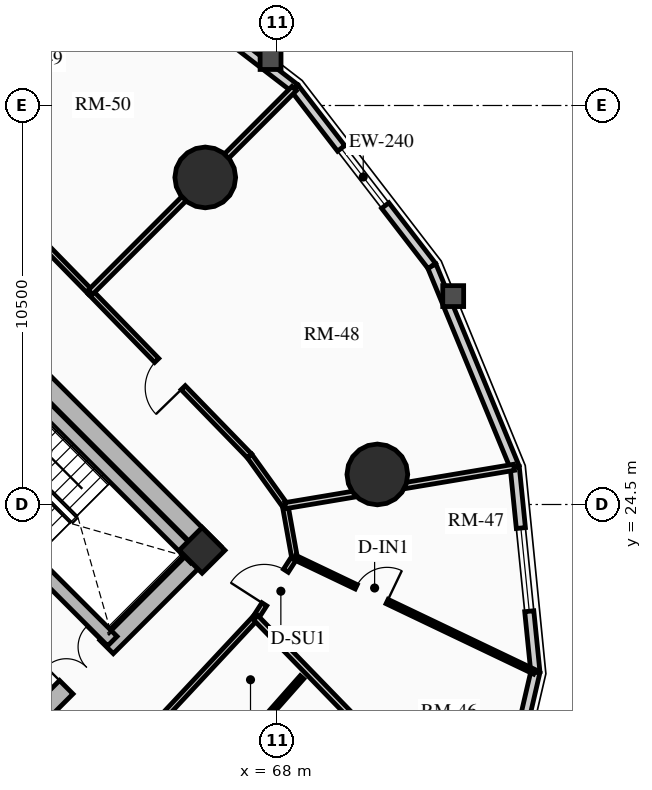
"""IFC4 building model, lengths in metres.
Left out: names, types, materials, properties, quantities, classifications, styles, units other than length and angle.
Written with IfcOpenShell. Run it as: python <this file> out.ifc"""

import sys

from ifc_helpers import new_model, si_unit, direction, frame, frame_2d, origin, origin_2d, place, context, subcontext, project, spatial, rectangle, circle, extrude, source, transform, mapped, element, fill, save


model = new_model("IFC4")
c1 = context("Model", 3, precision=1e-05, world=origin(), true_north=direction((0.0, 1.0)))
c2 = subcontext(c1, "Body", "Model", "MODEL_VIEW")
j1 = project(units=[si_unit("LENGTHUNIT", "METRE"), si_unit("PLANEANGLEUNIT", "RADIAN")], contexts=[c1])
p1 = place(None, origin())
s1 = spatial("IfcSite", under=j1, at=p1, CompositionType="ELEMENT")
p2 = place(p1, origin())
s2 = spatial("IfcBuilding", under=s1, at=p2, CompositionType="ELEMENT")
p3 = place(p2, frame((0.0, 0.0, 36.55)))
s3 = spatial("IfcBuildingStorey", under=s2, at=p3, CompositionType="ELEMENT", Elevation=36.55)
p4 = place(p3, frame((66.339, 23.227, 0.0), z_axis=(0.0, 0.0, 1.0), x_axis=(-0.707106781187, 0.707106781187, 0.0)))
e1 = element("IfcWall", 1, at=p4, inside=s3, PredefinedType="SHEAR", context=c2, shape_type="SweptSolid", body=[
    extrude(rectangle(XDim=14.3, YDim=0.5, at=frame_2d((7.15, 0.0))), origin(), (0.0, 0.0, 1.0), 2.91),
])
p5 = place(p3, frame((58.596, 15.838, 0.0), z_axis=(0.0, 0.0, 1.0), x_axis=(0.707106781187, 0.707106781187, 0.0)))
e2 = element("IfcWall", 2, at=p5, inside=s3, PredefinedType="SHEAR", context=c2, shape_type="SweptSolid", body=[
    extrude(rectangle(XDim=10.7, YDim=0.5, at=frame_2d((5.35, 0.0))), origin(), (0.0, 0.0, 1.0), 2.91),
])
m1 = source(origin(), c2, "Body", "SweptSolid", [
    extrude(rectangle(XDim=1.5, YDim=2.02, at=frame_2d((0.75, 1.01))), frame((0.0, 0.26, 0.0), z_axis=(0.0, -1.0, 0.0), x_axis=(1.0, 0.0, 0.0)), (0.0, 0.0, 1.0), 0.52),
])
p6 = place(p5, frame((5.45, 0.0, 0.0)))
e3 = element("IfcOpeningElement", 3, at=p6, cuts=e2, PredefinedType="OPENING", context=c2, shape_type="MappedRepresentation", body=[
    mapped(m1, transform((0.0, 0.0, 0.0), x_axis=(1.0, 0.0, 0.0), y_axis=(0.0, 1.0, 0.0), z_axis=(0.0, 0.0, 1.0), scale=1.0)),
])
p7 = place(p3, frame((63.662, 20.904, 0.0), z_axis=(0.0, 0.0, 1.0), x_axis=(-0.707106781187, 0.707106781187, 0.0)))
e4 = element("IfcWall", 4, at=p7, inside=s3, PredefinedType="SHEAR", context=c2, shape_type="SweptSolid", body=[
    extrude(rectangle(XDim=13.8, YDim=0.35, at=frame_2d((6.9, 0.0))), origin(), (0.0, 0.0, 1.0), 2.91),
])
m2 = source(origin(), c2, "Body", "SweptSolid", [
    extrude(rectangle(XDim=1.1, YDim=2.015, at=frame_2d((0.55, 1.007))), frame((0.0, 0.185, 0.0), z_axis=(0.0, -1.0, 0.0), x_axis=(1.0, 0.0, 0.0)), (0.0, 0.0, 1.0), 0.37),
])
p8 = place(p7, frame((10.025, 0.0, 0.0)))
e5 = element("IfcOpeningElement", 5, at=p8, cuts=e4, PredefinedType="OPENING", context=c2, shape_type="MappedRepresentation", body=[
    mapped(m2, transform((0.0, 0.0, 0.0), x_axis=(1.0, 0.0, 0.0), y_axis=(0.0, 1.0, 0.0), z_axis=(0.0, 0.0, 1.0), scale=1.0)),
])
p9 = place(p7, frame((12.025, 0.0, 0.0)))
e6 = element("IfcOpeningElement", 6, at=p9, cuts=e4, PredefinedType="OPENING", context=c2, shape_type="MappedRepresentation", body=[
    mapped(m2, transform((0.0, 0.0, 0.0), x_axis=(1.0, 0.0, 0.0), y_axis=(0.0, 1.0, 0.0), z_axis=(0.0, 0.0, 1.0), scale=1.0)),
])
m3 = source(origin(), c2, "Body", "SweptSolid", [
    extrude(rectangle(XDim=1.15, YDim=2.02, at=frame_2d((0.575, 1.01))), frame((0.0, 0.185, 0.0), z_axis=(0.0, -1.0, 0.0), x_axis=(1.0, 0.0, 0.0)), (0.0, 0.0, 1.0), 0.37),
])
p10 = place(p7, frame((5.33, 0.0, 0.0)))
e7 = element("IfcOpeningElement", 7, at=p10, cuts=e4, PredefinedType="OPENING", context=c2, shape_type="MappedRepresentation", body=[
    mapped(m3, transform((0.0, 0.0, 0.0), x_axis=(1.0, 0.0, 0.0), y_axis=(0.0, 1.0, 0.0), z_axis=(0.0, 0.0, 1.0), scale=1.0)),
])
p11 = place(p3, frame((65.847, 23.089, 0.0), z_axis=(0.0, 0.0, 1.0), x_axis=(-0.707106781187, 0.707106781187, 0.0)))
e8 = element("IfcWall", 8, at=p11, inside=s3, PredefinedType="SHEAR", context=c2, shape_type="SweptSolid", body=[
    extrude(rectangle(XDim=6.745, YDim=0.35, at=frame_2d((3.373, 0.0))), origin(), (0.0, 0.0, 1.0), 2.91),
])
p12 = place(p3, frame((66.024, 23.294, 0.0), z_axis=(0.0, 0.0, 1.0), x_axis=(0.707106781187, 0.707106781187, 0.0)))
e9 = element("IfcColumn", 9, at=p12, inside=s3, PredefinedType="COLUMN", context=c2, shape_type="SweptSolid", body=[
    extrude(rectangle(XDim=0.85, YDim=0.85, at=origin_2d()), origin(), (0.0, 0.0, 1.0), 2.91),
])
for number, where, z_axis, x_axis in (
    (10, (66.107, 33.107, 0.0), (0.0, 0.0, 1.0), (1.0, 0.0, 0.0)),
    (11, (70.635, 25.291, 0.0), (0.0, 0.0, 1.0), (1.0, 0.0, 0.0)),
):
    element("IfcColumn", number, at=place(p3, frame(where, z_axis=z_axis, x_axis=x_axis)), inside=s3, PredefinedType="USERDEFINED", context=c2, shape_type="SweptSolid", body=[
        extrude(circle(Radius=0.8, at=origin_2d()), origin(), (0.0, 0.0, 1.0), 2.91),
    ])
p13 = place(p3, frame((63.778, 39.068, 0.0), z_axis=(0.0, 0.0, 1.0), x_axis=(0.792020182601, -0.610494906082, 0.0)))
e12 = element("IfcWall", 12, at=p13, inside=s3, PredefinedType="SOLIDWALL", context=c2, shape_type="SweptSolid", body=[
    extrude(rectangle(XDim=5.911, YDim=0.24, at=frame_2d((2.956, 0.0))), origin(), (0.0, 0.0, 1.0), 2.073),
])
p14 = place(p3, frame((74.794, 20.09, 0.0), z_axis=(0.0, 0.0, 1.0), x_axis=(-0.22582585901, -0.974167686491, 0.0)))
e13 = element("IfcWall", 13, at=p14, inside=s3, PredefinedType="SOLIDWALL", context=c2, shape_type="SweptSolid", body=[
    extrude(rectangle(XDim=5.092, YDim=0.24, at=frame_2d((2.546, 0.0))), origin(), (0.0, 0.0, 1.0), 2.073),
])
p15 = place(p3, frame((74.251, 25.482, 0.0), z_axis=(0.0, 0.0, 1.0), x_axis=(0.100190592135, -0.994968263437, 0.0)))
e14 = element("IfcWall", 14, at=p15, inside=s3, PredefinedType="SOLIDWALL", context=c2, shape_type="SweptSolid", body=[
    extrude(rectangle(XDim=5.419, YDim=0.24, at=frame_2d((2.71, 0.0))), origin(), (0.0, 0.0, 1.0), 2.073),
])
m4 = source(origin(), c2, "Body", "SweptSolid", [
    extrude(rectangle(XDim=2.2, YDim=1.35, at=frame_2d((1.1, 0.675))), frame((0.0, 0.13, 0.0), z_axis=(0.0, -1.0, 0.0), x_axis=(1.0, 0.0, 0.0)), (0.0, 0.0, 1.0), 0.26),
])
p16 = place(p15, frame((1.61, 0.0, 0.65)))
e15 = element("IfcOpeningElement", 15, at=p16, cuts=e14, PredefinedType="OPENING", context=c2, shape_type="MappedRepresentation", body=[
    mapped(m4, transform((0.0, 0.0, 0.0), x_axis=(1.0, 0.0, 0.0), y_axis=(0.0, 1.0, 0.0), z_axis=(0.0, 0.0, 1.0), scale=1.0)),
])
p17 = place(p3, frame((72.068, 30.778, 0.0), z_axis=(0.0, 0.0, 1.0), x_axis=(0.381077764176, -0.924542988536, 0.0)))
e16 = element("IfcWall", 16, at=p17, inside=s3, PredefinedType="SOLIDWALL", context=c2, shape_type="SweptSolid", body=[
    extrude(rectangle(XDim=5.728, YDim=0.24, at=frame_2d((2.864, 0.0))), origin(), (0.0, 0.0, 1.0), 2.073),
])
p18 = place(p3, frame((68.459, 35.459, 0.0), z_axis=(0.0, 0.0, 1.0), x_axis=(0.610494906082, -0.792020182601, 0.0)))
e17 = element("IfcWall", 17, at=p18, inside=s3, PredefinedType="SOLIDWALL", context=c2, shape_type="SweptSolid", body=[
    extrude(rectangle(XDim=5.911, YDim=0.24, at=frame_2d((2.956, 0.0))), origin(), (0.0, 0.0, 1.0), 2.073),
])
m5 = source(origin(), c2, "Body", "SweptSolid", [
    extrude(rectangle(XDim=1.9, YDim=1.35, at=frame_2d((0.95, 0.675))), frame((0.0, 0.13, 0.0), z_axis=(0.0, -1.0, 0.0), x_axis=(1.0, 0.0, 0.0)), (0.0, 0.0, 1.0), 0.26),
])
p19 = place(p18, frame((2.005, 0.0, 0.65)))
e18 = element("IfcOpeningElement", 18, at=p19, cuts=e17, PredefinedType="OPENING", context=c2, shape_type="MappedRepresentation", body=[
    mapped(m5, transform((0.0, 0.0, 0.0), x_axis=(1.0, 0.0, 0.0), y_axis=(0.0, 1.0, 0.0), z_axis=(0.0, 0.0, 1.0), scale=1.0)),
])
p20 = place(p3, frame((63.086, 30.086, 0.0), z_axis=(0.0, 0.0, 1.0), x_axis=(-0.699075897379, 0.715047473741, 0.0)))
e19 = element("IfcWall", 19, at=p20, inside=s3, PredefinedType="PARTITIONING", context=c2, shape_type="SweptSolid", body=[
    extrude(rectangle(XDim=6.114, YDim=0.15, at=frame_2d((3.057, 0.0))), origin(), (0.0, 0.0, 1.0), 2.159),
])
m6 = source(origin(), c2, "Body", "SweptSolid", [
    extrude(rectangle(XDim=1.05, YDim=2.015, at=frame_2d((0.525, 1.007))), frame((0.0, 0.085, 0.0), z_axis=(0.0, -1.0, 0.0), x_axis=(1.0, 0.0, 0.0)), (0.0, 0.0, 1.0), 0.17),
])
p21 = place(p20, frame((2.532, 0.0, 0.0)))
e20 = element("IfcOpeningElement", 20, at=p21, cuts=e19, PredefinedType="OPENING", context=c2, shape_type="MappedRepresentation", body=[
    mapped(m6, transform((0.0, 0.0, 0.0), x_axis=(1.0, 0.0, 0.0), y_axis=(0.0, 1.0, 0.0), z_axis=(0.0, 0.0, 1.0), scale=1.0)),
])
p22 = place(p3, frame((62.903, 16.667, 0.0), z_axis=(0.0, 0.0, 1.0), x_axis=(0.682371947497, 0.731005147225, 0.0)))
e21 = element("IfcWall", 21, at=p22, inside=s3, PredefinedType="PARTITIONING", context=c2, shape_type="SweptSolid", body=[
    extrude(rectangle(XDim=6.642, YDim=0.15, at=frame_2d((3.321, 0.0))), origin(), (0.0, 0.0, 1.0), 2.159),
])
p23 = place(p3, frame((67.435, 21.521, 0.0), z_axis=(0.0, 0.0, 1.0), x_axis=(0.540777197838, 0.841165870859, 0.0)))
e22 = element("IfcWall", 22, at=p23, inside=s3, PredefinedType="PARTITIONING", context=c2, shape_type="SweptSolid", body=[
    extrude(rectangle(XDim=1.888, YDim=0.15, at=frame_2d((0.944, 0.0))), origin(), (0.0, 0.0, 1.0), 2.205),
])
p24 = place(p23, frame((0.419, 0.0, 0.0)))
e23 = element("IfcOpeningElement", 23, at=p24, cuts=e22, PredefinedType="OPENING", context=c2, shape_type="MappedRepresentation", body=[
    mapped(m6, transform((0.0, 0.0, 0.0), x_axis=(1.0, 0.0, 0.0), y_axis=(0.0, 1.0, 0.0), z_axis=(0.0, 0.0, 1.0), scale=1.0)),
])
p25 = place(p3, frame((68.456, 23.11, 0.0), z_axis=(0.0, 0.0, 1.0), x_axis=(-0.1772522795, 0.984165448191, 0.0)))
e24 = element("IfcWall", 24, at=p25, inside=s3, PredefinedType="PARTITIONING", context=c2, shape_type="SweptSolid", body=[
    extrude(rectangle(XDim=1.382, YDim=0.15, at=frame_2d((0.691, 0.0))), origin(), (0.0, 0.0, 1.0), 2.159),
])
p26 = place(p3, frame((68.211, 24.469, 0.0), z_axis=(0.0, 0.0, 1.0), x_axis=(-0.583012141368, 0.812463441034, 0.0)))
e25 = element("IfcWall", 25, at=p26, inside=s3, PredefinedType="PARTITIONING", context=c2, shape_type="SweptSolid", body=[
    extrude(rectangle(XDim=1.613, YDim=0.15, at=frame_2d((0.807, 0.0))), origin(), (0.0, 0.0, 1.0), 2.205),
])
p27 = place(p3, frame((67.27, 25.78, 0.0), z_axis=(0.0, 0.0, 1.0), x_axis=(-0.696847842907, 0.717218992942, 0.0)))
e26 = element("IfcWall", 26, at=p27, inside=s3, PredefinedType="PARTITIONING", context=c2, shape_type="SweptSolid", body=[
    extrude(rectangle(XDim=6.004, YDim=0.15, at=frame_2d((3.002, 0.0))), origin(), (0.0, 0.0, 1.0), 2.635),
])
m7 = source(origin(), c2, "Body", "SweptSolid", [
    extrude(rectangle(XDim=1.0, YDim=2.015, at=frame_2d((0.5, 1.007))), frame((0.0, 0.085, 0.0), z_axis=(0.0, -1.0, 0.0), x_axis=(1.0, 0.0, 0.0)), (0.0, 0.0, 1.0), 0.17),
])
p28 = place(p27, frame((2.502, 0.0, 0.0)))
e27 = element("IfcOpeningElement", 27, at=p28, cuts=e26, PredefinedType="OPENING", context=c2, shape_type="MappedRepresentation", body=[
    mapped(m7, transform((0.0, 0.0, 0.0), x_axis=(1.0, 0.0, 0.0), y_axis=(0.0, 1.0, 0.0), z_axis=(0.0, 0.0, 1.0), scale=1.0)),
])
p29 = place(p3, frame((63.086, 30.086, 0.0), z_axis=(0.0, 0.0, 1.0), x_axis=(0.707106781187, 0.707106781187, 0.0)))
e28 = element("IfcWall", 28, at=p29, inside=s3, PredefinedType="PARTITIONING", context=c2, shape_type="SweptSolid", body=[
    extrude(rectangle(XDim=7.579, YDim=0.16, at=frame_2d((3.79, 0.0))), origin(), (0.0, 0.0, 1.0), 2.073),
])
p30 = place(p3, frame((67.435, 21.521, 0.0), z_axis=(0.0, 0.0, 1.0), x_axis=(0.6962628802, -0.717786877601, 0.0)))
e29 = element("IfcWall", 29, at=p30, inside=s3, PredefinedType="PARTITIONING", context=c2, shape_type="SweptSolid", body=[
    extrude(rectangle(XDim=8.893, YDim=0.16, at=frame_2d((4.446, 0.0))), origin(), (0.0, 0.0, 1.0), 2.073),
])
p31 = place(p3, frame((68.211, 24.469, 0.0), z_axis=(0.0, 0.0, 1.0), x_axis=(0.986231309699, 0.165371713934, 0.0)))
e30 = element("IfcWall", 30, at=p31, inside=s3, PredefinedType="PARTITIONING", context=c2, shape_type="SweptSolid", body=[
    extrude(rectangle(XDim=6.104, YDim=0.16, at=frame_2d((3.052, 0.0))), origin(), (0.0, 0.0, 1.0), 2.073),
])
p32 = place(p3, frame((66.667, 17.709, 0.0), z_axis=(0.0, 0.0, 1.0), x_axis=(0.662510581678, 0.749052554341, 0.0)))
e31 = element("IfcWall", 31, at=p32, inside=s3, PredefinedType="PARTITIONING", context=c2, shape_type="SweptSolid", body=[
    extrude(rectangle(XDim=2.996, YDim=0.125, at=frame_2d((1.498, 0.0))), origin(), (0.0, 0.0, 1.0), 2.159),
])
m8 = source(origin(), c2, "Body", "SweptSolid", [
    extrude(rectangle(XDim=0.9, YDim=2.005, at=frame_2d((0.45, 1.002))), frame((0.0, 0.073, 0.0), z_axis=(0.0, -1.0, 0.0), x_axis=(1.0, 0.0, 0.0)), (0.0, 0.0, 1.0), 0.145),
])
p33 = place(p32, frame((0.12, 0.0, 0.0)))
e32 = element("IfcOpeningElement", 32, at=p33, cuts=e31, PredefinedType="OPENING", context=c2, shape_type="MappedRepresentation", body=[
    mapped(m8, transform((0.0, 0.0, 0.0), x_axis=(1.0, 0.0, 0.0), y_axis=(0.0, 1.0, 0.0), z_axis=(0.0, 0.0, 1.0), scale=1.0)),
])
p34 = place(p3, frame((68.456, 23.11, 0.0), z_axis=(0.0, 0.0, 1.0), x_axis=(0.902430819297, -0.430834790125, 0.0)))
e33 = element("IfcWall", 33, at=p34, inside=s3, PredefinedType="PARTITIONING", context=c2, shape_type="SweptSolid", body=[
    extrude(rectangle(XDim=7.002, YDim=0.125, at=frame_2d((3.501, 0.0))), origin(), (0.0, 0.0, 1.0), 2.073),
])
p35 = place(p34, frame((1.8, 0.0, 0.0)))
e34 = element("IfcOpeningElement", 34, at=p35, cuts=e33, PredefinedType="OPENING", context=c2, shape_type="MappedRepresentation", body=[
    mapped(m8, transform((0.0, 0.0, 0.0), x_axis=(1.0, 0.0, 0.0), y_axis=(0.0, 1.0, 0.0), z_axis=(0.0, 0.0, 1.0), scale=1.0)),
])
m9 = source(origin(), c2, "Body", "SweptSolid", [
    extrude(rectangle(XDim=2.2, YDim=1.35, at=frame_2d((1.1, 0.675))), frame((0.0, 0.03, 0.0), z_axis=(0.0, -1.0, 0.0), x_axis=(1.0, 0.0, 0.0)), (0.0, 0.0, 1.0), 0.06),
])
p36 = place(p16, origin())
e35 = element("IfcWindow", 35, at=p36, inside=s3, PartitioningType="DOUBLE_PANEL_VERTICAL", PredefinedType="WINDOW", context=c2, shape_type="MappedRepresentation", body=[
    mapped(m9, transform((0.0, 0.0, 0.0), x_axis=(1.0, 0.0, 0.0), y_axis=(0.0, 1.0, 0.0), z_axis=(0.0, 0.0, 1.0), scale=1.0)),
])
fill(e15, e35)
m10 = source(origin(), c2, "Body", "SweptSolid", [
    extrude(rectangle(XDim=1.9, YDim=1.35, at=frame_2d((0.95, 0.675))), frame((0.0, 0.03, 0.0), z_axis=(0.0, -1.0, 0.0), x_axis=(1.0, 0.0, 0.0)), (0.0, 0.0, 1.0), 0.06),
])
p37 = place(p19, origin())
e36 = element("IfcWindow", 36, at=p37, inside=s3, PartitioningType="DOUBLE_PANEL_VERTICAL", PredefinedType="WINDOW", context=c2, shape_type="MappedRepresentation", body=[
    mapped(m10, transform((0.0, 0.0, 0.0), x_axis=(1.0, 0.0, 0.0), y_axis=(0.0, 1.0, 0.0), z_axis=(0.0, 0.0, 1.0), scale=1.0)),
])
fill(e18, e36)
m11 = source(origin(), c2, "Body", "SweptSolid", [
    extrude(rectangle(XDim=1.5, YDim=2.02, at=frame_2d((0.75, 1.01))), frame((0.0, 0.025, 0.0), z_axis=(0.0, -1.0, 0.0), x_axis=(1.0, 0.0, 0.0)), (0.0, 0.0, 1.0), 0.05),
])
p38 = place(p6, origin())
e37 = element("IfcDoor", 37, at=p38, inside=s3, OperationType="DOUBLE_DOOR_SINGLE_SWING", PredefinedType="DOOR", context=c2, shape_type="MappedRepresentation", body=[
    mapped(m11, transform((0.0, 0.0, 0.0), x_axis=(1.0, 0.0, 0.0), y_axis=(0.0, 1.0, 0.0), z_axis=(0.0, 0.0, 1.0), scale=1.0)),
])
fill(e3, e37)
m12 = source(origin(), c2, "Body", "SweptSolid", [
    extrude(rectangle(XDim=1.05, YDim=2.015, at=frame_2d((0.525, 1.007))), frame((0.0, 0.025, 0.0), z_axis=(0.0, -1.0, 0.0), x_axis=(1.0, 0.0, 0.0)), (0.0, 0.0, 1.0), 0.05),
])
p39 = place(p24, origin())
e38 = element("IfcDoor", 38, at=p39, inside=s3, OperationType="SINGLE_SWING_LEFT", PredefinedType="DOOR", context=c2, shape_type="MappedRepresentation", body=[
    mapped(m12, transform((0.0, 0.0, 0.0), x_axis=(1.0, 0.0, 0.0), y_axis=(0.0, 1.0, 0.0), z_axis=(0.0, 0.0, 1.0), scale=1.0)),
])
fill(e23, e38)
m13 = source(origin(), c2, "Body", "SweptSolid", [
    extrude(rectangle(XDim=0.9, YDim=2.005, at=frame_2d((0.45, 1.002))), frame((0.0, 0.025, 0.0), z_axis=(0.0, -1.0, 0.0), x_axis=(1.0, 0.0, 0.0)), (0.0, 0.0, 1.0), 0.05),
])
p40 = place(p35, origin())
e39 = element("IfcDoor", 39, at=p40, inside=s3, OperationType="SINGLE_SWING_RIGHT", PredefinedType="DOOR", context=c2, shape_type="MappedRepresentation", body=[
    mapped(m13, transform((0.0, 0.0, 0.0), x_axis=(1.0, 0.0, 0.0), y_axis=(0.0, 1.0, 0.0), z_axis=(0.0, 0.0, 1.0), scale=1.0)),
])
fill(e34, e39)
m14 = source(origin(), c2, "Body", "SweptSolid", [
    extrude(rectangle(XDim=1.0, YDim=2.015, at=frame_2d((0.5, 1.007))), frame((0.0, 0.025, 0.0), z_axis=(0.0, -1.0, 0.0), x_axis=(1.0, 0.0, 0.0)), (0.0, 0.0, 1.0), 0.05),
])
p41 = place(p28, origin())
e40 = element("IfcDoor", 40, at=p41, inside=s3, OperationType="SINGLE_SWING_LEFT", PredefinedType="DOOR", context=c2, shape_type="MappedRepresentation", body=[
    mapped(m14, transform((0.0, 0.0, 0.0), x_axis=(1.0, 0.0, 0.0), y_axis=(0.0, 1.0, 0.0), z_axis=(0.0, 0.0, 1.0), scale=1.0)),
])
fill(e27, e40)
save(model, sys.argv[1])
